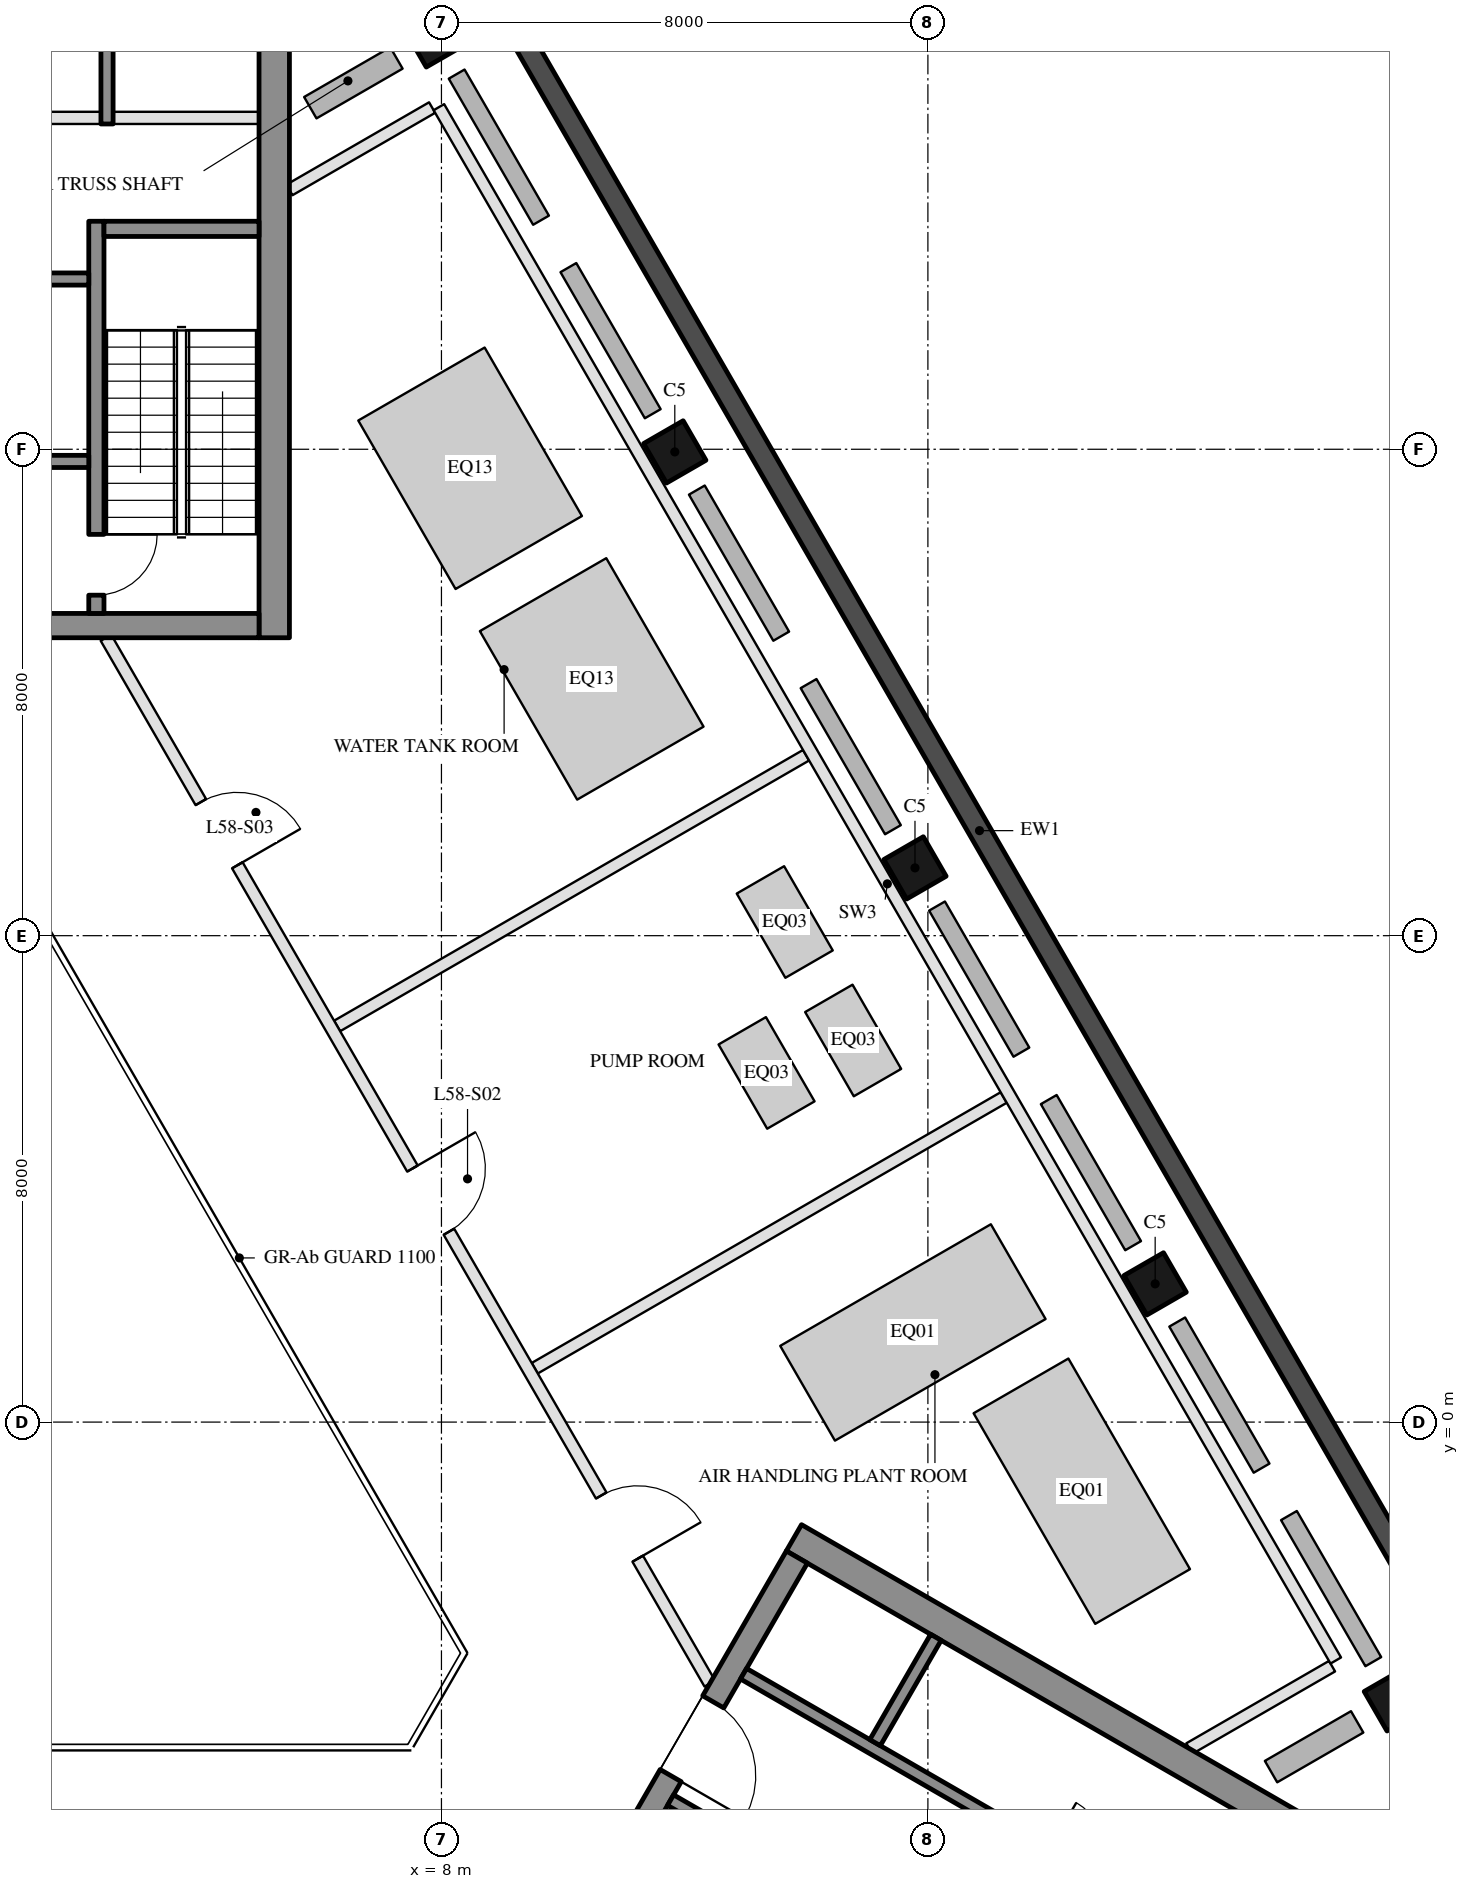
"""IFC4 building model, lengths in metres.
Left out: names, types, materials, properties, quantities, classifications, styles, units other than length and angle.
Written with IfcOpenShell. Run it as: python <this file> out.ifc"""

import sys

from ifc_helpers import new_model, si_unit, direction, frame, frame_2d, origin, origin_2d, place, context, subcontext, project, spatial, rectangle, hollow_rectangle, extrude, element, fill, save


model = new_model("IFC4")
c1 = context("Model", 3, precision=1e-05, world=origin(), true_north=direction((0.0, 1.0)))
c2 = subcontext(c1, "Body", "Model", "MODEL_VIEW")
j1 = project(units=[si_unit("LENGTHUNIT", "METRE"), si_unit("PLANEANGLEUNIT", "RADIAN")], contexts=[c1])
p1 = place(None, origin())
s1 = spatial("IfcSite", under=j1, at=p1, CompositionType="ELEMENT")
p2 = place(p1, origin())
s2 = spatial("IfcBuilding", under=s1, at=p2, CompositionType="ELEMENT")
p3 = place(p2, frame((0.0, 0.0, 237.7)))
s3 = spatial("IfcBuildingStorey", under=s2, at=p3, CompositionType="ELEMENT", Elevation=237.7)
for number, where, z_axis, x_axis in (
    (1, (23.688, -4.568, 0.0), (0.0, 0.0, 1.0), (-0.5, 0.866, 0.0)),
    (2, (19.738, 2.273, 0.0), (0.0, 0.0, 1.0), (-0.5, 0.866, 0.0)),
    (3, (15.788, 9.115, 0.0), (0.0, 0.0, 1.0), (-0.5, 0.866, 0.0)),
    (4, (11.838, 15.957, 0.0), (0.0, 0.0, 1.0), (-0.5, 0.866, 0.0)),
    (5, (7.888, 22.798, 0.0), (0.0, 0.0, 1.0), (-0.5, 0.866, 0.0)),
):
    element("IfcColumn", number, at=place(p3, frame(where, z_axis=z_axis, x_axis=x_axis)), inside=s3, PredefinedType="COLUMN", context=c2, shape_type="SweptSolid", body=[
        extrude(hollow_rectangle(XDim=0.75, YDim=0.75, WallThickness=0.035, at=origin_2d()), origin(), (0.0, 0.0, 1.0), 4.5),
    ])
p4 = place(p3, frame((26.256, -6.567, 0.0), z_axis=(0.0, 0.0, 1.0), x_axis=(-0.499998380999, 0.866026338513, 0.0)))
e6 = element("IfcWall", 6, at=p4, inside=s3, PredefinedType="SOLIDWALL", context=c2, shape_type="SweptSolid", body=[
    extrude(rectangle(XDim=37.631, YDim=0.35, at=frame_2d((18.816, 0.0))), origin(), (0.0, 0.0, 1.0), 4.2),
])
p5 = place(p3, frame((5.25, 12.9, 0.0), z_axis=(0.0, 0.0, 1.0), x_axis=(0.0, 1.0, 0.0)))
e7 = element("IfcWall", 7, at=p5, inside=s3, PredefinedType="SHEAR", context=c2, shape_type="SweptSolid", body=[
    extrude(rectangle(XDim=14.837, YDim=0.5, at=frame_2d((7.418, 0.0))), origin(), (0.0, 0.0, 1.0), 4.2),
])
p6 = place(p3, frame((5.0, 13.1, 0.0), z_axis=(0.0, 0.0, 1.0), x_axis=(-1.0, 0.0, 0.0)))
e8 = element("IfcWall", 8, at=p6, inside=s3, PredefinedType="SHEAR", context=c2, shape_type="SweptSolid", body=[
    extrude(rectangle(XDim=10.0, YDim=0.4, at=frame_2d((5.0, 0.0))), origin(), (0.0, 0.0, 1.0), 4.2),
])
p7 = place(p6, frame((3.55, 0.0, 0.0)))
e9 = element("IfcOpeningElement", 9, at=p7, cuts=e8, PredefinedType="OPENING", context=c2, shape_type="SweptSolid", body=[
    extrude(rectangle(XDim=1.1, YDim=2.1, at=frame_2d((0.55, 1.05))), frame((0.0, 0.21, 0.0), z_axis=(0.0, -1.0, 0.0), x_axis=(1.0, 0.0, 0.0)), (0.0, 0.0, 1.0), 0.42),
])
p8 = place(p6, frame((5.85, 0.0, 0.0)))
e10 = element("IfcOpeningElement", 10, at=p8, cuts=e8, PredefinedType="OPENING", context=c2, shape_type="SweptSolid", body=[
    extrude(rectangle(XDim=1.4, YDim=2.1, at=frame_2d((0.7, 1.05))), frame((0.0, 0.21, 0.0), z_axis=(0.0, -1.0, 0.0), x_axis=(1.0, 0.0, 0.0)), (0.0, 0.0, 1.0), 0.42),
])
p9 = place(p3, frame((2.325, 13.3, 0.0), z_axis=(0.0, 0.0, 1.0), x_axis=(0.0, 1.0, 0.0)))
e11 = element("IfcWall", 11, at=p9, inside=s3, PredefinedType="SHEAR", context=c2, shape_type="SweptSolid", body=[
    extrude(rectangle(XDim=6.45, YDim=0.25, at=frame_2d((3.225, 0.0))), origin(), (0.0, 0.0, 1.0), 4.2),
])
p10 = place(p9, frame((0.3, 0.0, 0.0)))
e12 = element("IfcOpeningElement", 12, at=p10, cuts=e11, PredefinedType="OPENING", context=c2, shape_type="SweptSolid", body=[
    extrude(rectangle(XDim=1.0, YDim=2.1, at=frame_2d((0.5, 1.05))), frame((0.0, 0.135, 0.0), z_axis=(0.0, -1.0, 0.0), x_axis=(1.0, 0.0, 0.0)), (0.0, 0.0, 1.0), 0.27),
])
p11 = place(p3, frame((5.0, 19.625, 0.0), z_axis=(0.0, 0.0, 1.0), x_axis=(-1.0, 0.0, 0.0)))
e13 = element("IfcWall", 13, at=p11, inside=s3, PredefinedType="SHEAR", context=c2, shape_type="SweptSolid", body=[
    extrude(rectangle(XDim=2.55, YDim=0.25, at=frame_2d((1.275, 0.0))), origin(), (0.0, 0.0, 1.0), 4.2),
])
p12 = place(p3, frame((2.2, 18.8, 0.0), z_axis=(0.0, 0.0, 1.0), x_axis=(-1.0, 0.0, 0.0)))
e14 = element("IfcWall", 14, at=p12, inside=s3, PredefinedType="SHEAR", context=c2, shape_type="SweptSolid", body=[
    extrude(rectangle(XDim=2.8, YDim=0.2, at=frame_2d((1.4, 0.0))), origin(), (0.0, 0.0, 1.0), 4.2),
])
p13 = place(p3, frame((2.2, 15.8, 0.0), z_axis=(0.0, 0.0, 1.0), x_axis=(-1.0, 0.0, 0.0)))
e15 = element("IfcWall", 15, at=p13, inside=s3, PredefinedType="SHEAR", context=c2, shape_type="SweptSolid", body=[
    extrude(rectangle(XDim=2.8, YDim=0.2, at=frame_2d((1.4, 0.0))), origin(), (0.0, 0.0, 1.0), 4.2),
])
p14 = place(p13, frame((0.7, 0.0, 0.0)))
e16 = element("IfcOpeningElement", 16, at=p14, cuts=e15, PredefinedType="OPENING", context=c2, shape_type="SweptSolid", body=[
    extrude(rectangle(XDim=1.2, YDim=2.1, at=frame_2d((0.6, 1.05))), frame((0.0, 0.11, 0.0), z_axis=(0.0, -1.0, 0.0), x_axis=(1.0, 0.0, 0.0)), (0.0, 0.0, 1.0), 0.22),
])
p15 = place(p3, frame((2.5, 21.35, 0.0), z_axis=(0.0, 0.0, 1.0), x_axis=(0.0, 1.0, 0.0)))
e17 = element("IfcWall", 17, at=p15, inside=s3, PredefinedType="SHEAR", context=c2, shape_type="SweptSolid", body=[
    extrude(rectangle(XDim=2.8, YDim=0.2, at=frame_2d((1.4, 0.0))), origin(), (0.0, 0.0, 1.0), 4.2),
])
p16 = place(p3, frame((5.0, 21.45, 0.0), z_axis=(0.0, 0.0, 1.0), x_axis=(-1.0, 0.0, 0.0)))
e18 = element("IfcWall", 18, at=p16, inside=s3, PredefinedType="PARTITIONING", context=c2, shape_type="SweptSolid", body=[
    extrude(rectangle(XDim=2.4, YDim=0.2, at=frame_2d((1.2, 0.0))), origin(), (0.0, 0.0, 1.0), 4.2),
])
p17 = place(p3, frame((2.4, 21.45, 0.0), z_axis=(0.0, 0.0, 1.0), x_axis=(-1.0, 0.0, 0.0)))
e19 = element("IfcWall", 19, at=p17, inside=s3, PredefinedType="PARTITIONING", context=c2, shape_type="SweptSolid", body=[
    extrude(rectangle(XDim=2.8, YDim=0.2, at=frame_2d((1.4, 0.0))), origin(), (0.0, 0.0, 1.0), 4.2),
])
p18 = place(p3, frame((13.797, -1.903, 0.0), z_axis=(0.0, 0.0, 1.0), x_axis=(0.866025009528, -0.500000682871, 0.0)))
e20 = element("IfcWall", 20, at=p18, inside=s3, PredefinedType="SHEAR", context=c2, shape_type="SweptSolid", body=[
    extrude(rectangle(XDim=14.837, YDim=0.5, at=frame_2d((7.418, 0.0))), origin(), (0.0, 0.0, 1.0), 4.2),
])
p19 = place(p3, frame((8.845, -10.88, 0.0), z_axis=(0.0, 0.0, 1.0), x_axis=(0.500004234368, 0.866022959057, 0.0)))
e21 = element("IfcWall", 21, at=p19, inside=s3, PredefinedType="SHEAR", context=c2, shape_type="SweptSolid", body=[
    extrude(rectangle(XDim=10.0, YDim=0.4, at=frame_2d((5.0, 0.0))), origin(), (0.0, 0.0, 1.0), 4.2),
])
p20 = place(p19, frame((3.55, 0.0, 0.0)))
e22 = element("IfcOpeningElement", 22, at=p20, cuts=e21, PredefinedType="OPENING", context=c2, shape_type="SweptSolid", body=[
    extrude(rectangle(XDim=1.1, YDim=2.1, at=frame_2d((0.55, 1.05))), frame((0.0, 0.21, 0.0), z_axis=(0.0, -1.0, 0.0), x_axis=(1.0, 0.0, 0.0)), (0.0, 0.0, 1.0), 0.42),
])
p21 = place(p19, frame((5.85, 0.0, 0.0)))
e23 = element("IfcOpeningElement", 23, at=p21, cuts=e21, PredefinedType="OPENING", context=c2, shape_type="SweptSolid", body=[
    extrude(rectangle(XDim=1.4, YDim=2.1, at=frame_2d((0.7, 1.05))), frame((0.0, 0.21, 0.0), z_axis=(0.0, -1.0, 0.0), x_axis=(1.0, 0.0, 0.0)), (0.0, 0.0, 1.0), 0.42),
])
p22 = place(p3, frame((11.768, -6.217, 0.0), z_axis=(0.0, 0.0, 1.0), x_axis=(0.866050077142, -0.499957262057, 0.0)))
e24 = element("IfcWall", 24, at=p22, inside=s3, PredefinedType="SHEAR", context=c2, shape_type="SweptSolid", body=[
    extrude(rectangle(XDim=2.4, YDim=0.2, at=frame_2d((1.2, 0.0))), origin(), (0.0, 0.0, 1.0), 4.2),
])
p23 = place(p3, frame((12.968, -4.138, 0.0), z_axis=(0.0, 0.0, 1.0), x_axis=(0.866028328073, -0.49999493495, 0.0)))
e25 = element("IfcWall", 25, at=p23, inside=s3, PredefinedType="SHEAR", context=c2, shape_type="SweptSolid", body=[
    extrude(rectangle(XDim=10.16, YDim=0.2, at=frame_2d((5.08, 0.0))), origin(), (0.0, 0.0, 1.0), 4.2),
])
p24 = place(p23, frame((5.8, 0.0, 0.0)))
e26 = element("IfcOpeningElement", 26, at=p24, cuts=e25, PredefinedType="OPENING", context=c2, shape_type="SweptSolid", body=[
    extrude(rectangle(XDim=0.9, YDim=2.1, at=frame_2d((0.45, 1.05))), frame((0.0, 0.11, 0.0), z_axis=(0.0, -1.0, 0.0), x_axis=(1.0, 0.0, 0.0)), (0.0, 0.0, 1.0), 0.22),
])
p25 = place(p3, frame((15.131, -5.272, 0.0), z_axis=(0.0, 0.0, 1.0), x_axis=(0.499972520799, 0.866041268327, 0.0)))
e27 = element("IfcWall", 27, at=p25, inside=s3, PredefinedType="SHEAR", context=c2, shape_type="SweptSolid", body=[
    extrude(rectangle(XDim=2.0, YDim=0.2, at=frame_2d((1.0, 0.0))), origin(), (0.0, 0.0, 1.0), 4.2),
])
p26 = place(p3, frame((22.646, -4.015, 0.0), z_axis=(0.0, 0.0, 1.0), x_axis=(-0.866044551023, -0.499966834543, 0.0)))
e28 = element("IfcWall", 28, at=p26, inside=s3, PredefinedType="PARTITIONING", context=c2, shape_type="SweptSolid", body=[
    extrude(rectangle(XDim=2.71, YDim=0.2, at=frame_2d((1.355, 0.0))), origin(), (0.0, 0.0, 1.0), 4.2),
])
p27 = place(p3, frame((17.246, 5.338, 0.0), z_axis=(0.0, 0.0, 1.0), x_axis=(-0.866029443717, -0.499993002566, 0.0)))
e29 = element("IfcWall", 29, at=p27, inside=s3, PredefinedType="PARTITIONING", context=c2, shape_type="SweptSolid", body=[
    extrude(rectangle(XDim=8.905, YDim=0.2, at=frame_2d((4.453, 0.0))), origin(), (0.0, 0.0, 1.0), 3.41),
])
p28 = place(p3, frame((13.996, 10.968, 0.0), z_axis=(0.0, 0.0, 1.0), x_axis=(-0.866029443717, -0.499993002566, 0.0)))
e30 = element("IfcWall", 30, at=p28, inside=s3, PredefinedType="PARTITIONING", context=c2, shape_type="SweptSolid", body=[
    extrude(rectangle(XDim=8.905, YDim=0.2, at=frame_2d((4.453, 0.0))), origin(), (0.0, 0.0, 1.0), 4.2),
])
p29 = place(p3, frame((7.846, 21.62, 0.0), z_axis=(0.0, 0.0, 1.0), x_axis=(-0.866022026288, -0.50000584995, 0.0)))
e31 = element("IfcWall", 31, at=p29, inside=s3, PredefinedType="PARTITIONING", context=c2, shape_type="SweptSolid", body=[
    extrude(rectangle(XDim=2.709, YDim=0.2, at=frame_2d((1.355, 0.0))), origin(), (0.0, 0.0, 1.0), 4.2),
])
p30 = place(p3, frame((22.708, -3.921, 0.0), z_axis=(0.0, 0.0, 1.0), x_axis=(-0.499998500593, 0.866026269466, 0.0)))
e32 = element("IfcWall", 32, at=p30, inside=s3, PredefinedType="PARTITIONING", context=c2, shape_type="SweptSolid", body=[
    extrude(rectangle(XDim=29.5, YDim=0.2, at=frame_2d((14.75, 0.0))), origin(), (0.0, 0.0, 1.0), 3.41),
])
p31 = place(p3, frame((12.413, -4.3, 0.0), z_axis=(0.0, 0.0, 1.0), x_axis=(-0.50000478328, 0.866022642139, 0.0)))
e33 = element("IfcWall", 33, at=p31, inside=s3, PredefinedType="PARTITIONING", context=c2, shape_type="SweptSolid", body=[
    extrude(rectangle(XDim=19.861, YDim=0.2, at=frame_2d((9.931, 0.0))), origin(), (0.0, 0.0, 1.0), 3.41),
])
p32 = place(p31, frame((2.371, 0.0, 0.0)))
e34 = element("IfcOpeningElement", 34, at=p32, cuts=e33, PredefinedType="OPENING", context=c2, shape_type="SweptSolid", body=[
    extrude(rectangle(XDim=1.2, YDim=2.1, at=frame_2d((0.6, 1.05))), frame((0.0, 0.11, 0.0), z_axis=(0.0, -1.0, 0.0), x_axis=(1.0, 0.0, 0.0)), (0.0, 0.0, 1.0), 0.22),
])
p33 = place(p31, frame((8.581, 0.0, 0.0)))
e35 = element("IfcOpeningElement", 35, at=p33, cuts=e33, PredefinedType="OPENING", context=c2, shape_type="SweptSolid", body=[
    extrude(rectangle(XDim=1.2, YDim=2.1, at=frame_2d((0.6, 1.05))), frame((0.0, 0.11, 0.0), z_axis=(0.0, -1.0, 0.0), x_axis=(1.0, 0.0, 0.0)), (0.0, 0.0, 1.0), 0.22),
])
p34 = place(p31, frame((15.54, 0.0, 0.0)))
e36 = element("IfcOpeningElement", 36, at=p34, cuts=e33, PredefinedType="OPENING", context=c2, shape_type="SweptSolid", body=[
    extrude(rectangle(XDim=1.2, YDim=2.1, at=frame_2d((0.6, 1.05))), frame((0.0, 0.11, 0.0), z_axis=(0.0, -1.0, 0.0), x_axis=(1.0, 0.0, 0.0)), (0.0, 0.0, 1.0), 0.22),
])
p35 = place(p10, frame((1.0, 0.0, 0.0), z_axis=(0.0, 0.0, 1.0), x_axis=(-1.0, 0.0, 0.0)))
e37 = element("IfcDoor", 37, at=p35, inside=s3, OperationType="SINGLE_SWING_LEFT", PredefinedType="DOOR", context=c2, shape_type="SweptSolid", body=[
    extrude(rectangle(XDim=1.0, YDim=2.1, at=frame_2d((0.5, 1.05))), frame((0.0, 0.025, 0.0), z_axis=(0.0, -1.0, 0.0), x_axis=(1.0, 0.0, 0.0)), (0.0, 0.0, 1.0), 0.05),
])
fill(e12, e37)
p36 = place(p21, frame((1.4, 0.0, 0.0), z_axis=(0.0, 0.0, 1.0), x_axis=(-1.0, 0.0, 0.0)))
e38 = element("IfcDoor", 38, at=p36, inside=s3, OperationType="DOUBLE_DOOR_SINGLE_SWING", PredefinedType="DOOR", context=c2, shape_type="SweptSolid", body=[
    extrude(rectangle(XDim=1.4, YDim=2.1, at=frame_2d((0.7, 1.05))), frame((0.0, 0.025, 0.0), z_axis=(0.0, -1.0, 0.0), x_axis=(1.0, 0.0, 0.0)), (0.0, 0.0, 1.0), 0.05),
])
fill(e23, e38)
p37 = place(p32, frame((1.2, 0.0, 0.0), z_axis=(0.0, 0.0, 1.0), x_axis=(-1.0, 0.0, 0.0)))
e39 = element("IfcDoor", 39, at=p37, inside=s3, OperationType="SINGLE_SWING_RIGHT", PredefinedType="DOOR", context=c2, shape_type="SweptSolid", body=[
    extrude(rectangle(XDim=1.2, YDim=2.1, at=frame_2d((0.6, 1.05))), frame((0.0, 0.025, 0.0), z_axis=(0.0, -1.0, 0.0), x_axis=(1.0, 0.0, 0.0)), (0.0, 0.0, 1.0), 0.05),
])
fill(e34, e39)
p38 = place(p33, frame((1.2, 0.0, 0.0), z_axis=(0.0, 0.0, 1.0), x_axis=(-1.0, 0.0, 0.0)))
e40 = element("IfcDoor", 40, at=p38, inside=s3, OperationType="SINGLE_SWING_LEFT", PredefinedType="DOOR", context=c2, shape_type="SweptSolid", body=[
    extrude(rectangle(XDim=1.2, YDim=2.1, at=frame_2d((0.6, 1.05))), frame((0.0, 0.025, 0.0), z_axis=(0.0, -1.0, 0.0), x_axis=(1.0, 0.0, 0.0)), (0.0, 0.0, 1.0), 0.05),
])
fill(e35, e40)
p39 = place(p34, frame((1.2, 0.0, 0.0), z_axis=(0.0, 0.0, 1.0), x_axis=(-1.0, 0.0, 0.0)))
e41 = element("IfcDoor", 41, at=p39, inside=s3, OperationType="SINGLE_SWING_RIGHT", PredefinedType="DOOR", context=c2, shape_type="SweptSolid", body=[
    extrude(rectangle(XDim=1.2, YDim=2.1, at=frame_2d((0.6, 1.05))), frame((0.0, 0.025, 0.0), z_axis=(0.0, -1.0, 0.0), x_axis=(1.0, 0.0, 0.0)), (0.0, 0.0, 1.0), 0.05),
])
fill(e36, e41)
save(model, sys.argv[1])
